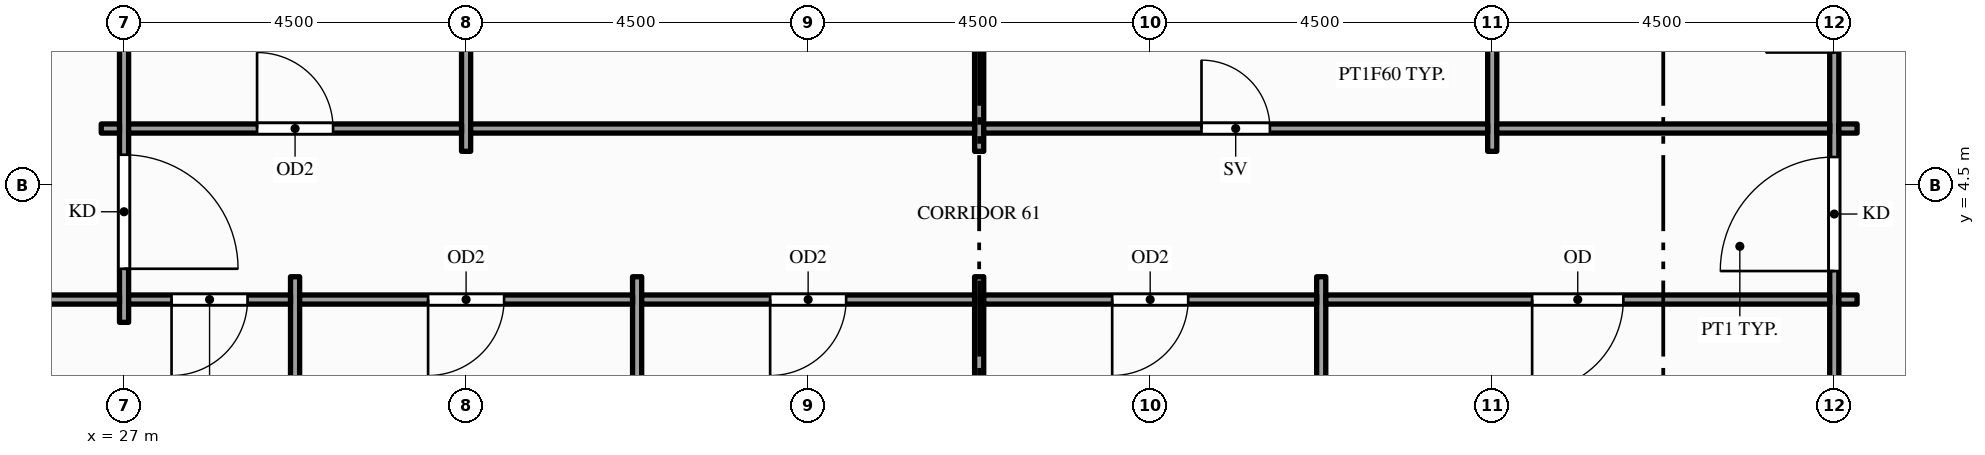
"""IFC4 building model, lengths in metres.
Left out: names, types, materials, properties, quantities, classifications, styles, units other than length and angle.
Written with IfcOpenShell. Run it as: python <this file> out.ifc"""

import sys

from ifc_helpers import new_model, si_unit, direction, frame, frame_2d, origin, place, context, subcontext, project, spatial, rectangle, extrude, element, fill, save


model = new_model("IFC4")
c1 = context("Model", 3, precision=1e-05, world=origin(), true_north=direction((0.0, 1.0)))
c2 = subcontext(c1, "Body", "Model", "MODEL_VIEW")
j1 = project(units=[si_unit("LENGTHUNIT", "METRE"), si_unit("PLANEANGLEUNIT", "RADIAN")], contexts=[c1])
p1 = place(None, origin())
s1 = spatial("IfcSite", under=j1, at=p1, CompositionType="ELEMENT")
p2 = place(p1, origin())
s2 = spatial("IfcBuilding", under=s1, at=p2, CompositionType="ELEMENT")
p3 = place(p2, frame((0.0, 0.0, 215.0)))
s3 = spatial("IfcBuildingStorey", under=s2, at=p3, CompositionType="ELEMENT", Elevation=215.0)
p4 = place(p3, frame((27.0, 2.7, 0.0), z_axis=(0.0, 0.0, 1.0), x_axis=(0.0, 1.0, 0.0)))
e1 = element("IfcWall", 1, at=p4, inside=s3, PredefinedType="PARTITIONING", context=c2, shape_type="SweptSolid", body=[
    extrude(rectangle(XDim=14.1, YDim=0.12, at=frame_2d((7.05, 0.0))), origin(), (0.0, 0.0, 1.0), 2.87),
])
p5 = place(p4, frame((0.705, 0.0, 0.0)))
e2 = element("IfcOpeningElement", 2, at=p5, cuts=e1, PredefinedType="OPENING", context=c2, shape_type="SweptSolid", body=[
    extrude(rectangle(XDim=1.5, YDim=2.1, at=frame_2d((0.75, 1.05))), frame((0.0, 0.07, 0.0), z_axis=(0.0, -1.0, 0.0), x_axis=(1.0, 0.0, 0.0)), (0.0, 0.0, 1.0), 0.14),
])
p6 = place(p4, frame((11.895, 0.0, 0.0)))
e3 = element("IfcOpeningElement", 3, at=p6, cuts=e1, PredefinedType="OPENING", context=c2, shape_type="SweptSolid", body=[
    extrude(rectangle(XDim=1.5, YDim=2.1, at=frame_2d((0.75, 1.05))), frame((0.0, 0.07, 0.0), z_axis=(0.0, -1.0, 0.0), x_axis=(1.0, 0.0, 0.0)), (0.0, 0.0, 1.0), 0.14),
])
p7 = place(p3, frame((29.25, -1.35, 0.0), z_axis=(0.0, 0.0, 1.0), x_axis=(0.0, 1.0, 0.0)))
e4 = element("IfcWall", 4, at=p7, inside=s3, PredefinedType="PARTITIONING", context=c2, shape_type="SweptSolid", body=[
    extrude(rectangle(XDim=4.65, YDim=0.12, at=frame_2d((2.325, 0.0))), origin(), (0.0, 0.0, 1.0), 2.87),
])
p8 = place(p3, frame((31.5, 4.95, 0.0), z_axis=(0.0, 0.0, 1.0), x_axis=(0.0, 1.0, 0.0)))
e5 = element("IfcWall", 5, at=p8, inside=s3, PredefinedType="PARTITIONING", context=c2, shape_type="SweptSolid", body=[
    extrude(rectangle(XDim=9.6, YDim=0.12, at=frame_2d((4.8, 0.0))), origin(), (0.0, 0.0, 1.0), 2.87),
])
for number, where, z_axis, x_axis in (
    (6, (33.75, -1.35, 0.0), (0.0, 0.0, 1.0), (0.0, 1.0, 0.0)),
    (7, (38.25, -1.35, 0.0), (0.0, 0.0, 1.0), (0.0, 1.0, 0.0)),
):
    element("IfcWall", number, at=place(p3, frame(where, z_axis=z_axis, x_axis=x_axis)), inside=s3, PredefinedType="PARTITIONING", context=c2, shape_type="SweptSolid", body=[
        extrude(rectangle(XDim=4.65, YDim=0.12, at=frame_2d((2.325, 0.0))), origin(), (0.0, 0.0, 1.0), 2.87),
    ])
p9 = place(p3, frame((38.25, 4.95, 0.0), z_axis=(0.0, 0.0, 1.0), x_axis=(0.0, 1.0, 0.0)))
e8 = element("IfcWall", 8, at=p9, inside=s3, PredefinedType="PARTITIONING", context=c2, shape_type="SweptSolid", body=[
    extrude(rectangle(XDim=9.6, YDim=0.12, at=frame_2d((4.8, 0.0))), origin(), (0.0, 0.0, 1.0), 2.87),
])
p10 = place(p3, frame((42.75, -1.35, 0.0), z_axis=(0.0, 0.0, 1.0), x_axis=(0.0, 1.0, 0.0)))
e9 = element("IfcWall", 9, at=p10, inside=s3, PredefinedType="PARTITIONING", context=c2, shape_type="SweptSolid", body=[
    extrude(rectangle(XDim=4.65, YDim=0.12, at=frame_2d((2.325, 0.0))), origin(), (0.0, 0.0, 1.0), 2.87),
])
p11 = place(p3, frame((45.0, 4.95, 0.0), z_axis=(0.0, 0.0, 1.0), x_axis=(0.0, 1.0, 0.0)))
e10 = element("IfcWall", 10, at=p11, inside=s3, PredefinedType="PARTITIONING", context=c2, shape_type="SweptSolid", body=[
    extrude(rectangle(XDim=9.6, YDim=0.12, at=frame_2d((4.8, 0.0))), origin(), (0.0, 0.0, 1.0), 2.87),
])
p12 = place(p3, frame((49.5, -1.35, 0.0), z_axis=(0.0, 0.0, 1.0), x_axis=(0.0, 1.0, 0.0)))
e11 = element("IfcWall", 11, at=p12, inside=s3, PredefinedType="PARTITIONING", context=c2, shape_type="SweptSolid", body=[
    extrude(rectangle(XDim=22.2, YDim=0.12, at=frame_2d((11.1, 0.0))), origin(), (0.0, 0.0, 1.0), 2.87),
])
p13 = place(p12, frame((4.725, 0.0, 0.0)))
e12 = element("IfcOpeningElement", 12, at=p13, cuts=e11, PredefinedType="OPENING", context=c2, shape_type="SweptSolid", body=[
    extrude(rectangle(XDim=1.5, YDim=2.1, at=frame_2d((0.75, 1.05))), frame((0.0, 0.07, 0.0), z_axis=(0.0, -1.0, 0.0), x_axis=(1.0, 0.0, 0.0)), (0.0, 0.0, 1.0), 0.14),
])
p14 = place(p12, frame((15.975, 0.0, 0.0)))
e13 = element("IfcOpeningElement", 13, at=p14, cuts=e11, PredefinedType="OPENING", context=c2, shape_type="SweptSolid", body=[
    extrude(rectangle(XDim=1.5, YDim=2.1, at=frame_2d((0.75, 1.05))), frame((0.0, 0.07, 0.0), z_axis=(0.0, -1.0, 0.0), x_axis=(1.0, 0.0, 0.0)), (0.0, 0.0, 1.0), 0.14),
])
p15 = place(p12, frame((7.6, 0.0, 0.0)))
e14 = element("IfcOpeningElement", 14, at=p15, cuts=e11, PredefinedType="OPENING", context=c2, shape_type="SweptSolid", body=[
    extrude(rectangle(XDim=0.9, YDim=2.1, at=frame_2d((0.45, 1.05))), frame((0.0, 0.07, 0.0), z_axis=(0.0, -1.0, 0.0), x_axis=(1.0, 0.0, 0.0)), (0.0, 0.0, 1.0), 0.14),
])
p16 = place(p12, frame((10.65, 0.0, 0.0)))
e15 = element("IfcOpeningElement", 15, at=p16, cuts=e11, PredefinedType="OPENING", context=c2, shape_type="SweptSolid", body=[
    extrude(rectangle(XDim=0.9, YDim=2.1, at=frame_2d((0.45, 1.05))), frame((0.0, 0.07, 0.0), z_axis=(0.0, -1.0, 0.0), x_axis=(1.0, 0.0, 0.0)), (0.0, 0.0, 1.0), 0.14),
])
p17 = place(p12, frame((13.6, 0.0, 0.0)))
e16 = element("IfcOpeningElement", 16, at=p17, cuts=e11, PredefinedType="OPENING", context=c2, shape_type="SweptSolid", body=[
    extrude(rectangle(XDim=1.0, YDim=2.1, at=frame_2d((0.5, 1.05))), frame((0.0, 0.07, 0.0), z_axis=(0.0, -1.0, 0.0), x_axis=(1.0, 0.0, 0.0)), (0.0, 0.0, 1.0), 0.14),
])
p18 = place(p3, frame((24.81, 3.0, 0.0), z_axis=(0.0, 0.0, 1.0), x_axis=(1.0, 0.0, 0.0)))
e17 = element("IfcWall", 17, at=p18, inside=s3, PredefinedType="PARTITIONING", context=c2, shape_type="SweptSolid", body=[
    extrude(rectangle(XDim=2.13, YDim=0.12, at=frame_2d((1.065, 0.0))), origin(), (0.0, 0.0, 1.0), 2.76),
])
p19 = place(p3, frame((27.06, 3.0, 0.0), z_axis=(0.0, 0.0, 1.0), x_axis=(1.0, 0.0, 0.0)))
e18 = element("IfcWall", 18, at=p19, inside=s3, PredefinedType="PARTITIONING", context=c2, shape_type="SweptSolid", body=[
    extrude(rectangle(XDim=2.13, YDim=0.12, at=frame_2d((1.065, 0.0))), origin(), (0.0, 0.0, 1.0), 2.87),
])
p20 = place(p19, frame((0.565, 0.0, 0.0)))
e19 = element("IfcOpeningElement", 19, at=p20, cuts=e18, PredefinedType="OPENING", context=c2, shape_type="SweptSolid", body=[
    extrude(rectangle(XDim=1.0, YDim=2.1, at=frame_2d((0.5, 1.05))), frame((0.0, 0.07, 0.0), z_axis=(0.0, -1.0, 0.0), x_axis=(1.0, 0.0, 0.0)), (0.0, 0.0, 1.0), 0.14),
])
p21 = place(p3, frame((29.31, 3.0, 0.0), z_axis=(0.0, 0.0, 1.0), x_axis=(1.0, 0.0, 0.0)))
e20 = element("IfcWall", 20, at=p21, inside=s3, PredefinedType="PARTITIONING", context=c2, shape_type="SweptSolid", body=[
    extrude(rectangle(XDim=4.38, YDim=0.12, at=frame_2d((2.19, 0.0))), origin(), (0.0, 0.0, 1.0), 2.87),
])
p22 = place(p21, frame((1.69, 0.0, 0.0)))
e21 = element("IfcOpeningElement", 21, at=p22, cuts=e20, PredefinedType="OPENING", context=c2, shape_type="SweptSolid", body=[
    extrude(rectangle(XDim=1.0, YDim=2.1, at=frame_2d((0.5, 1.05))), frame((0.0, 0.07, 0.0), z_axis=(0.0, -1.0, 0.0), x_axis=(1.0, 0.0, 0.0)), (0.0, 0.0, 1.0), 0.14),
])
p23 = place(p3, frame((33.81, 3.0, 0.0), z_axis=(0.0, 0.0, 1.0), x_axis=(1.0, 0.0, 0.0)))
e22 = element("IfcWall", 22, at=p23, inside=s3, PredefinedType="PARTITIONING", context=c2, shape_type="SweptSolid", body=[
    extrude(rectangle(XDim=4.38, YDim=0.12, at=frame_2d((2.19, 0.0))), origin(), (0.0, 0.0, 1.0), 2.87),
])
p24 = place(p23, frame((1.69, 0.0, 0.0)))
e23 = element("IfcOpeningElement", 23, at=p24, cuts=e22, PredefinedType="OPENING", context=c2, shape_type="SweptSolid", body=[
    extrude(rectangle(XDim=1.0, YDim=2.1, at=frame_2d((0.5, 1.05))), frame((0.0, 0.07, 0.0), z_axis=(0.0, -1.0, 0.0), x_axis=(1.0, 0.0, 0.0)), (0.0, 0.0, 1.0), 0.14),
])
p25 = place(p3, frame((38.31, 3.0, 0.0), z_axis=(0.0, 0.0, 1.0), x_axis=(1.0, 0.0, 0.0)))
e24 = element("IfcWall", 24, at=p25, inside=s3, PredefinedType="PARTITIONING", context=c2, shape_type="SweptSolid", body=[
    extrude(rectangle(XDim=4.38, YDim=0.12, at=frame_2d((2.19, 0.0))), origin(), (0.0, 0.0, 1.0), 2.87),
])
p26 = place(p25, frame((1.69, 0.0, 0.0)))
e25 = element("IfcOpeningElement", 25, at=p26, cuts=e24, PredefinedType="OPENING", context=c2, shape_type="SweptSolid", body=[
    extrude(rectangle(XDim=1.0, YDim=2.1, at=frame_2d((0.5, 1.05))), frame((0.0, 0.07, 0.0), z_axis=(0.0, -1.0, 0.0), x_axis=(1.0, 0.0, 0.0)), (0.0, 0.0, 1.0), 0.14),
])
p27 = place(p3, frame((42.81, 3.0, 0.0), z_axis=(0.0, 0.0, 1.0), x_axis=(1.0, 0.0, 0.0)))
e26 = element("IfcWall", 26, at=p27, inside=s3, PredefinedType="PARTITIONING", context=c2, shape_type="SweptSolid", body=[
    extrude(rectangle(XDim=6.63, YDim=0.12, at=frame_2d((3.315, 0.0))), origin(), (0.0, 0.0, 1.0), 2.87),
])
p28 = place(p27, frame((2.715, 0.0, 0.0)))
e27 = element("IfcOpeningElement", 27, at=p28, cuts=e26, PredefinedType="OPENING", context=c2, shape_type="SweptSolid", body=[
    extrude(rectangle(XDim=1.2, YDim=2.1, at=frame_2d((0.6, 1.05))), frame((0.0, 0.07, 0.0), z_axis=(0.0, -1.0, 0.0), x_axis=(1.0, 0.0, 0.0)), (0.0, 0.0, 1.0), 0.14),
])
for number, where, z_axis, x_axis in (
    (28, (49.56, 3.0, 0.0), (0.0, 0.0, 1.0), (1.0, 0.0, 0.0)),
    (29, (26.7, 5.25, 0.0), (0.0, 0.0, 1.0), (1.0, 0.0, 0.0)),
):
    element("IfcWall", number, at=place(p3, frame(where, z_axis=z_axis, x_axis=x_axis)), inside=s3, PredefinedType="PARTITIONING", context=c2, shape_type="SweptSolid", body=[
        extrude(rectangle(XDim=0.24, YDim=0.12, at=frame_2d((0.12, 0.0))), origin(), (0.0, 0.0, 1.0), 2.87),
    ])
p29 = place(p3, frame((27.06, 5.25, 0.0), z_axis=(0.0, 0.0, 1.0), x_axis=(1.0, 0.0, 0.0)))
e30 = element("IfcWall", 30, at=p29, inside=s3, PredefinedType="PARTITIONING", context=c2, shape_type="SweptSolid", body=[
    extrude(rectangle(XDim=4.38, YDim=0.12, at=frame_2d((2.19, 0.0))), origin(), (0.0, 0.0, 1.0), 2.87),
])
p30 = place(p29, frame((1.69, 0.0, 0.0)))
e31 = element("IfcOpeningElement", 31, at=p30, cuts=e30, PredefinedType="OPENING", context=c2, shape_type="SweptSolid", body=[
    extrude(rectangle(XDim=1.0, YDim=2.1, at=frame_2d((0.5, 1.05))), frame((0.0, 0.07, 0.0), z_axis=(0.0, -1.0, 0.0), x_axis=(1.0, 0.0, 0.0)), (0.0, 0.0, 1.0), 0.14),
])
p31 = place(p3, frame((31.56, 5.25, 0.0), z_axis=(0.0, 0.0, 1.0), x_axis=(1.0, 0.0, 0.0)))
e32 = element("IfcWall", 32, at=p31, inside=s3, PredefinedType="PARTITIONING", context=c2, shape_type="SweptSolid", body=[
    extrude(rectangle(XDim=6.63, YDim=0.12, at=frame_2d((3.315, 0.0))), origin(), (0.0, 0.0, 1.0), 2.87),
])
p32 = place(p3, frame((38.31, 5.25, 0.0), z_axis=(0.0, 0.0, 1.0), x_axis=(1.0, 0.0, 0.0)))
e33 = element("IfcWall", 33, at=p32, inside=s3, PredefinedType="PARTITIONING", context=c2, shape_type="SweptSolid", body=[
    extrude(rectangle(XDim=6.63, YDim=0.12, at=frame_2d((3.315, 0.0))), origin(), (0.0, 0.0, 1.0), 2.87),
])
p33 = place(p32, frame((2.865, 0.0, 0.0)))
e34 = element("IfcOpeningElement", 34, at=p33, cuts=e33, PredefinedType="OPENING", context=c2, shape_type="SweptSolid", body=[
    extrude(rectangle(XDim=0.9, YDim=2.1, at=frame_2d((0.45, 1.05))), frame((0.0, 0.07, 0.0), z_axis=(0.0, -1.0, 0.0), x_axis=(1.0, 0.0, 0.0)), (0.0, 0.0, 1.0), 0.14),
])
p34 = place(p3, frame((45.06, 5.25, 0.0), z_axis=(0.0, 0.0, 1.0), x_axis=(1.0, 0.0, 0.0)))
e35 = element("IfcWall", 35, at=p34, inside=s3, PredefinedType="PARTITIONING", context=c2, shape_type="SweptSolid", body=[
    extrude(rectangle(XDim=4.38, YDim=0.12, at=frame_2d((2.19, 0.0))), origin(), (0.0, 0.0, 1.0), 2.87),
])
p35 = place(p3, frame((49.56, 5.25, 0.0), z_axis=(0.0, 0.0, 1.0), x_axis=(1.0, 0.0, 0.0)))
e36 = element("IfcWall", 36, at=p35, inside=s3, PredefinedType="PARTITIONING", context=c2, shape_type="SweptSolid", body=[
    extrude(rectangle(XDim=0.24, YDim=0.12, at=frame_2d((0.12, 0.0))), origin(), (0.0, 0.0, 1.0), 2.87),
])
p36 = place(p5, origin())
e37 = element("IfcDoor", 37, at=p36, inside=s3, OperationType="SINGLE_SWING_LEFT", PredefinedType="DOOR", context=c2, shape_type="SweptSolid", body=[
    extrude(rectangle(XDim=1.5, YDim=2.1, at=frame_2d((0.75, 1.05))), frame((0.0, 0.025, 0.0), z_axis=(0.0, -1.0, 0.0), x_axis=(1.0, 0.0, 0.0)), (0.0, 0.0, 1.0), 0.05),
])
fill(e2, e37)
p37 = place(p13, origin())
e38 = element("IfcDoor", 38, at=p37, inside=s3, OperationType="SINGLE_SWING_LEFT", PredefinedType="DOOR", context=c2, shape_type="SweptSolid", body=[
    extrude(rectangle(XDim=1.5, YDim=2.1, at=frame_2d((0.75, 1.05))), frame((0.0, 0.025, 0.0), z_axis=(0.0, -1.0, 0.0), x_axis=(1.0, 0.0, 0.0)), (0.0, 0.0, 1.0), 0.05),
])
fill(e12, e38)
p38 = place(p30, origin())
e39 = element("IfcDoor", 39, at=p38, inside=s3, OperationType="SINGLE_SWING_LEFT", PredefinedType="DOOR", context=c2, shape_type="SweptSolid", body=[
    extrude(rectangle(XDim=1.0, YDim=2.1, at=frame_2d((0.5, 1.05))), frame((0.0, 0.025, 0.0), z_axis=(0.0, -1.0, 0.0), x_axis=(1.0, 0.0, 0.0)), (0.0, 0.0, 1.0), 0.05),
])
fill(e31, e39)
p39 = place(p33, origin())
e40 = element("IfcDoor", 40, at=p39, inside=s3, OperationType="SINGLE_SWING_LEFT", PredefinedType="DOOR", context=c2, shape_type="SweptSolid", body=[
    extrude(rectangle(XDim=0.9, YDim=2.1, at=frame_2d((0.45, 1.05))), frame((0.0, 0.025, 0.0), z_axis=(0.0, -1.0, 0.0), x_axis=(1.0, 0.0, 0.0)), (0.0, 0.0, 1.0), 0.05),
])
fill(e34, e40)
p40 = place(p20, origin())
e41 = element("IfcDoor", 41, at=p40, inside=s3, OperationType="SINGLE_SWING_LEFT", PredefinedType="DOOR", context=c2, shape_type="SweptSolid", body=[
    extrude(rectangle(XDim=1.0, YDim=2.1, at=frame_2d((0.5, 1.05))), frame((0.0, 0.025, 0.0), z_axis=(0.0, -1.0, 0.0), x_axis=(1.0, 0.0, 0.0)), (0.0, 0.0, 1.0), 0.05),
])
fill(e19, e41)
p41 = place(p22, origin())
e42 = element("IfcDoor", 42, at=p41, inside=s3, OperationType="SINGLE_SWING_LEFT", PredefinedType="DOOR", context=c2, shape_type="SweptSolid", body=[
    extrude(rectangle(XDim=1.0, YDim=2.1, at=frame_2d((0.5, 1.05))), frame((0.0, 0.025, 0.0), z_axis=(0.0, -1.0, 0.0), x_axis=(1.0, 0.0, 0.0)), (0.0, 0.0, 1.0), 0.05),
])
fill(e21, e42)
p42 = place(p24, origin())
e43 = element("IfcDoor", 43, at=p42, inside=s3, OperationType="SINGLE_SWING_LEFT", PredefinedType="DOOR", context=c2, shape_type="SweptSolid", body=[
    extrude(rectangle(XDim=1.0, YDim=2.1, at=frame_2d((0.5, 1.05))), frame((0.0, 0.025, 0.0), z_axis=(0.0, -1.0, 0.0), x_axis=(1.0, 0.0, 0.0)), (0.0, 0.0, 1.0), 0.05),
])
fill(e23, e43)
p43 = place(p26, origin())
e44 = element("IfcDoor", 44, at=p43, inside=s3, OperationType="SINGLE_SWING_LEFT", PredefinedType="DOOR", context=c2, shape_type="SweptSolid", body=[
    extrude(rectangle(XDim=1.0, YDim=2.1, at=frame_2d((0.5, 1.05))), frame((0.0, 0.025, 0.0), z_axis=(0.0, -1.0, 0.0), x_axis=(1.0, 0.0, 0.0)), (0.0, 0.0, 1.0), 0.05),
])
fill(e25, e44)
p44 = place(p28, origin())
e45 = element("IfcDoor", 45, at=p44, inside=s3, OperationType="SINGLE_SWING_LEFT", PredefinedType="DOOR", context=c2, shape_type="SweptSolid", body=[
    extrude(rectangle(XDim=1.2, YDim=2.1, at=frame_2d((0.6, 1.05))), frame((0.0, 0.025, 0.0), z_axis=(0.0, -1.0, 0.0), x_axis=(1.0, 0.0, 0.0)), (0.0, 0.0, 1.0), 0.05),
])
fill(e27, e45)
save(model, sys.argv[1])
